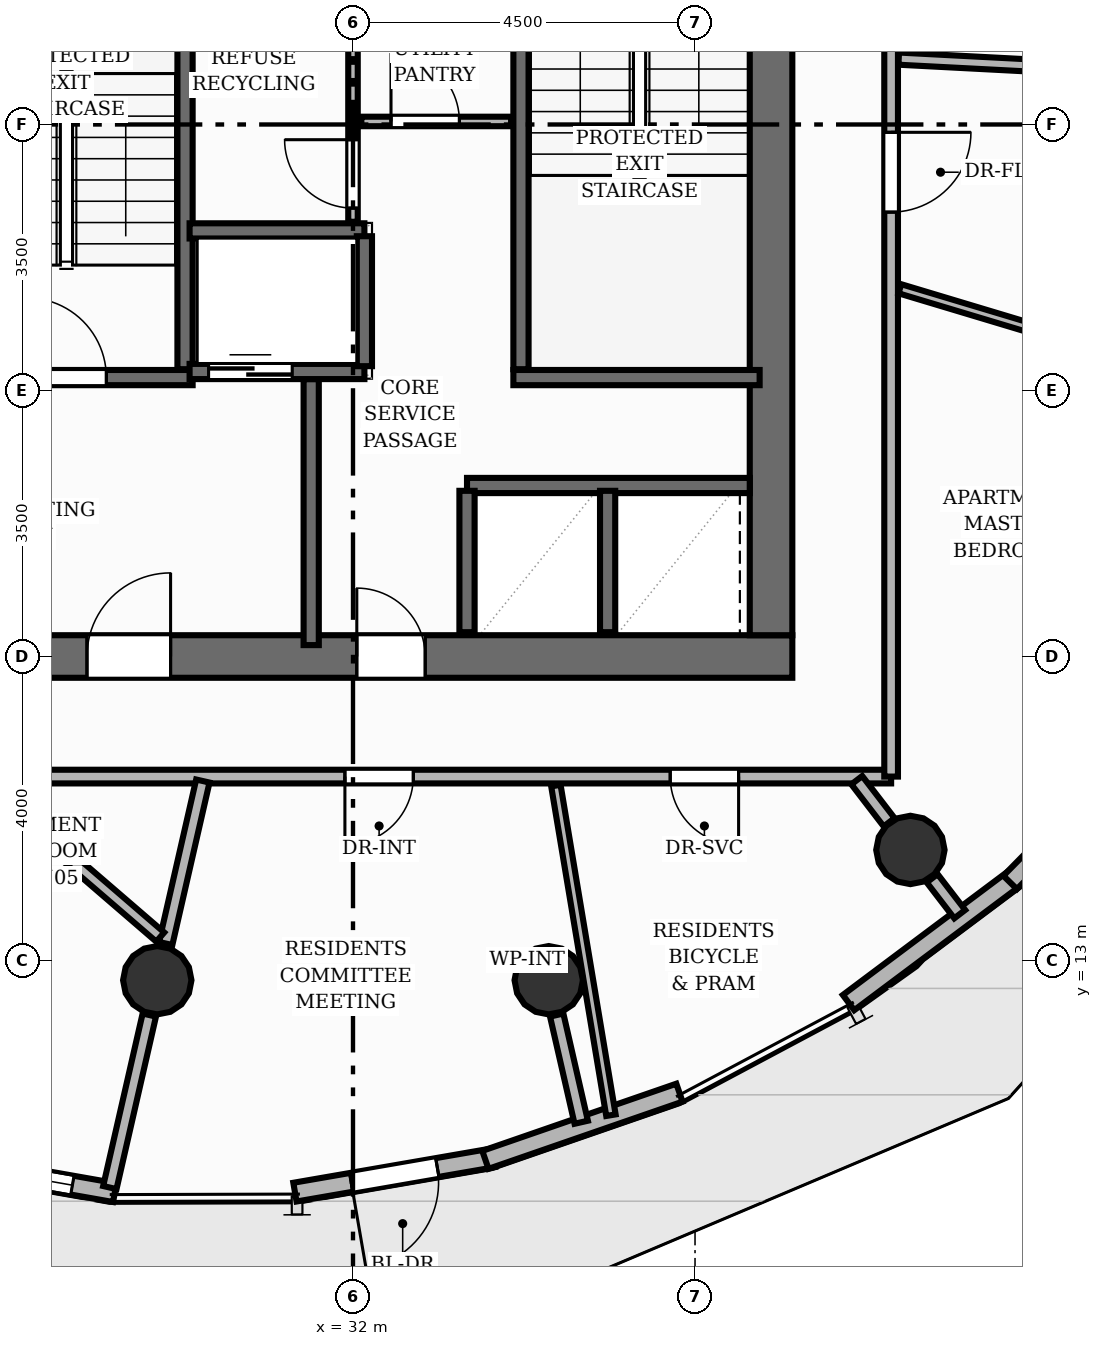
"""IFC4 building model, lengths in metres.
Left out: names, types, materials, properties, quantities, classifications, styles, units other than length and angle.
Written with IfcOpenShell. Run it as: python <this file> out.ifc"""

import sys

from ifc_helpers import new_model, si_unit, direction, frame, frame_2d, origin, origin_2d, place, context, subcontext, project, spatial, rectangle, circle, extrude, element, fill, save


model = new_model("IFC4")
c1 = context("Model", 3, precision=1e-05, world=origin(), true_north=direction((0.0, 1.0)))
c2 = subcontext(c1, "Body", "Model", "MODEL_VIEW")
j1 = project(units=[si_unit("LENGTHUNIT", "METRE"), si_unit("PLANEANGLEUNIT", "RADIAN")], contexts=[c1])
p1 = place(None, origin())
s1 = spatial("IfcSite", under=j1, at=p1, CompositionType="ELEMENT")
p2 = place(p1, origin())
s2 = spatial("IfcBuilding", under=s1, at=p2, CompositionType="ELEMENT")
p3 = place(p2, frame((0.0, 0.0, 172.64)))
s3 = spatial("IfcBuildingStorey", under=s2, at=p3, CompositionType="ELEMENT", Elevation=172.64)
p4 = place(p3, frame((26.22, 17.0, 0.0), z_axis=(0.0, 0.0, 1.0), x_axis=(1.0, 0.0, 0.0)))
e1 = element("IfcWall", 1, at=p4, inside=s3, PredefinedType="SHEAR", context=c2, shape_type="SweptSolid", body=[
    extrude(rectangle(XDim=11.56, YDim=0.56, at=frame_2d((5.78, 0.0))), origin(), (0.0, 0.0, 1.0), 3.2),
])
p5 = place(p4, frame((2.28, 0.0, 0.0)))
e2 = element("IfcOpeningElement", 2, at=p5, cuts=e1, PredefinedType="OPENING", context=c2, shape_type="SweptSolid", body=[
    extrude(rectangle(XDim=1.1, YDim=2.15, at=frame_2d((0.55, 1.075))), frame((0.0, 0.29, 0.0), z_axis=(0.0, -1.0, 0.0), x_axis=(1.0, 0.0, 0.0)), (0.0, 0.0, 1.0), 0.58),
])
p6 = place(p4, frame((5.83, 0.0, 0.0)))
e3 = element("IfcOpeningElement", 3, at=p6, cuts=e1, PredefinedType="OPENING", context=c2, shape_type="SweptSolid", body=[
    extrude(rectangle(XDim=0.9, YDim=2.1, at=frame_2d((0.45, 1.05))), frame((0.0, 0.29, 0.0), z_axis=(0.0, -1.0, 0.0), x_axis=(1.0, 0.0, 0.0)), (0.0, 0.0, 1.0), 0.58),
])
p7 = place(p3, frame((37.5, 17.28, 0.0), z_axis=(0.0, 0.0, 1.0), x_axis=(0.0, 1.0, 0.0)))
e4 = element("IfcWall", 4, at=p7, inside=s3, PredefinedType="SHEAR", context=c2, shape_type="SweptSolid", body=[
    extrude(rectangle(XDim=13.44, YDim=0.56, at=frame_2d((6.72, 0.0))), origin(), (0.0, 0.0, 1.0), 3.2),
])
for number, where, z_axis, x_axis in (
    (5, (29.425, 12.74, 0.0), (0.0, 0.0, 1.0), (1.0, 0.0, 0.0)),
    (6, (34.575, 12.74, 0.0), (0.0, 0.0, 1.0), (1.0, 0.0, 0.0)),
    (7, (39.333, 14.455, 0.0), (0.0, 0.0, 1.0), (1.0, 0.0, 0.0)),
):
    element("IfcColumn", number, at=place(p3, frame(where, z_axis=z_axis, x_axis=x_axis)), inside=s3, PredefinedType="COLUMN", context=c2, shape_type="SweptSolid", body=[
        extrude(circle(Radius=0.45, at=origin_2d()), origin(), (0.0, 0.0, 1.0), 3.2),
    ])
p8 = place(p3, frame((28.865, 9.945, 0.0), z_axis=(0.0, 0.0, 1.0), x_axis=(-0.984837873762, 0.173477267688, 0.0)))
e8 = element("IfcWall", 8, at=p8, inside=s3, PredefinedType="SOLIDWALL", context=c2, shape_type="SweptSolid", body=[
    extrude(rectangle(XDim=2.532, YDim=0.25, at=frame_2d((1.266, 0.0))), origin(), (0.0, 0.0, 1.0), 2.96),
])
p9 = place(p8, frame((0.566, 0.0, 0.85)))
e9 = element("IfcOpeningElement", 9, at=p9, cuts=e8, PredefinedType="OPENING", context=c2, shape_type="SweptSolid", body=[
    extrude(rectangle(XDim=1.4, YDim=1.55, at=frame_2d((0.7, 0.775))), frame((0.0, 0.135, 0.0), z_axis=(0.0, -1.0, 0.0), x_axis=(1.0, 0.0, 0.0)), (0.0, 0.0, 1.0), 0.27),
])
p10 = place(p3, frame((33.848, 10.405, 0.0), z_axis=(0.0, 0.0, 1.0), x_axis=(-0.985331154473, -0.170653203967, 0.0)))
e10 = element("IfcWall", 10, at=p10, inside=s3, PredefinedType="SOLIDWALL", context=c2, shape_type="SweptSolid", body=[
    extrude(rectangle(XDim=2.651, YDim=0.25, at=frame_2d((1.325, 0.0))), origin(), (0.0, 0.0, 1.0), 2.96),
])
p11 = place(p10, frame((0.75, 0.0, 0.0)))
e11 = element("IfcOpeningElement", 11, at=p11, cuts=e10, PredefinedType="OPENING", context=c2, shape_type="SweptSolid", body=[
    extrude(rectangle(XDim=1.15, YDim=2.2, at=frame_2d((0.575, 1.1))), frame((0.0, 0.135, 0.0), z_axis=(0.0, -1.0, 0.0), x_axis=(1.0, 0.0, 0.0)), (0.0, 0.0, 1.0), 0.27),
])
p12 = place(p3, frame((36.295, 11.261, 0.0), z_axis=(0.0, 0.0, 1.0), x_axis=(-0.945016150651, -0.327023661236, 0.0)))
e12 = element("IfcWall", 12, at=p12, inside=s3, PredefinedType="SOLIDWALL", context=c2, shape_type="SweptSolid", body=[
    extrude(rectangle(XDim=2.702, YDim=0.25, at=frame_2d((1.351, 0.0))), origin(), (0.0, 0.0, 1.0), 2.96),
])
p13 = place(p3, frame((40.728, 14.099, 0.0), z_axis=(0.0, 0.0, 1.0), x_axis=(-0.800636941996, -0.599149803564, 0.0)))
e13 = element("IfcWall", 13, at=p13, inside=s3, PredefinedType="SOLIDWALL", context=c2, shape_type="SweptSolid", body=[
    extrude(rectangle(XDim=2.758, YDim=0.25, at=frame_2d((1.379, 0.0))), origin(), (0.0, 0.0, 1.0), 2.96),
])
p14 = place(p3, frame((42.579, 15.995, 0.0), z_axis=(0.0, 0.0, 1.0), x_axis=(-0.700794099323, -0.713363603189, 0.0)))
e14 = element("IfcWall", 14, at=p14, inside=s3, PredefinedType="SOLIDWALL", context=c2, shape_type="SweptSolid", body=[
    extrude(rectangle(XDim=2.758, YDim=0.25, at=frame_2d((1.379, 0.0))), origin(), (0.0, 0.0, 1.0), 2.96),
])
p15 = place(p14, frame((0.554, 0.0, 0.85)))
e15 = element("IfcOpeningElement", 15, at=p15, cuts=e14, PredefinedType="OPENING", context=c2, shape_type="SweptSolid", body=[
    extrude(rectangle(XDim=1.65, YDim=1.55, at=frame_2d((0.825, 0.775))), frame((0.0, 0.135, 0.0), z_axis=(0.0, -1.0, 0.0), x_axis=(1.0, 0.0, 0.0)), (0.0, 0.0, 1.0), 0.27),
])
p16 = place(p3, frame((29.79, 20.78, 0.0), z_axis=(0.0, 0.0, 1.0), x_axis=(0.0, 1.0, 0.0)))
e16 = element("IfcWall", 16, at=p16, inside=s3, PredefinedType="SHEAR", context=c2, shape_type="SweptSolid", body=[
    extrude(rectangle(XDim=6.44, YDim=0.2, at=frame_2d((3.22, 0.0))), origin(), (0.0, 0.0, 1.0), 3.2),
])
p17 = place(p3, frame((26.65, 20.67, 0.0), z_axis=(0.0, 0.0, 1.0), x_axis=(1.0, 0.0, 0.0)))
e17 = element("IfcWall", 17, at=p17, inside=s3, PredefinedType="SHEAR", context=c2, shape_type="SweptSolid", body=[
    extrude(rectangle(XDim=3.24, YDim=0.2, at=frame_2d((1.62, 0.0))), origin(), (0.0, 0.0, 1.0), 3.2),
])
p18 = place(p17, frame((1.055, 0.0, 0.0)))
e18 = element("IfcOpeningElement", 18, at=p18, cuts=e17, PredefinedType="OPENING", context=c2, shape_type="SweptSolid", body=[
    extrude(rectangle(XDim=1.05, YDim=2.15, at=frame_2d((0.525, 1.075))), frame((0.0, 0.11, 0.0), z_axis=(0.0, -1.0, 0.0), x_axis=(1.0, 0.0, 0.0)), (0.0, 0.0, 1.0), 0.22),
])
p19 = place(p3, frame((34.21, 20.78, 0.0), z_axis=(0.0, 0.0, 1.0), x_axis=(0.0, 1.0, 0.0)))
e19 = element("IfcWall", 19, at=p19, inside=s3, PredefinedType="SHEAR", context=c2, shape_type="SweptSolid", body=[
    extrude(rectangle(XDim=6.44, YDim=0.2, at=frame_2d((3.22, 0.0))), origin(), (0.0, 0.0, 1.0), 3.2),
])
p20 = place(p3, frame((34.11, 20.67, 0.0), z_axis=(0.0, 0.0, 1.0), x_axis=(1.0, 0.0, 0.0)))
e20 = element("IfcWall", 20, at=p20, inside=s3, PredefinedType="SHEAR", context=c2, shape_type="SweptSolid", body=[
    extrude(rectangle(XDim=3.24, YDim=0.2, at=frame_2d((1.62, 0.0))), origin(), (0.0, 0.0, 1.0), 3.2),
])
p21 = place(p3, frame((31.45, 17.15, 0.0), z_axis=(0.0, 0.0, 1.0), x_axis=(0.0, 1.0, 0.0)))
e21 = element("IfcWall", 21, at=p21, inside=s3, PredefinedType="SHEAR", context=c2, shape_type="SweptSolid", body=[
    extrude(rectangle(XDim=3.5, YDim=0.2, at=frame_2d((1.75, 0.0))), origin(), (0.0, 0.0, 1.0), 3.2),
])
p22 = place(p3, frame((29.85, 20.75, 0.0), z_axis=(0.0, 0.0, 1.0), x_axis=(1.0, 0.0, 0.0)))
e22 = element("IfcWall", 22, at=p22, inside=s3, PredefinedType="SHEAR", context=c2, shape_type="SweptSolid", body=[
    extrude(rectangle(XDim=2.3, YDim=0.2, at=frame_2d((1.15, 0.0))), origin(), (0.0, 0.0, 1.0), 3.2),
])
p23 = place(p22, frame((0.25, 0.0, 0.0)))
e23 = element("IfcOpeningElement", 23, at=p23, cuts=e22, PredefinedType="OPENING", context=c2, shape_type="SweptSolid", body=[
    extrude(rectangle(XDim=1.1, YDim=2.15, at=frame_2d((0.55, 1.075))), frame((0.0, 0.11, 0.0), z_axis=(0.0, -1.0, 0.0), x_axis=(1.0, 0.0, 0.0)), (0.0, 0.0, 1.0), 0.22),
])
p24 = place(p3, frame((29.85, 22.6, 0.0), z_axis=(0.0, 0.0, 1.0), x_axis=(1.0, 0.0, 0.0)))
e24 = element("IfcWall", 24, at=p24, inside=s3, PredefinedType="SHEAR", context=c2, shape_type="SweptSolid", body=[
    extrude(rectangle(XDim=2.3, YDim=0.2, at=frame_2d((1.15, 0.0))), origin(), (0.0, 0.0, 1.0), 3.2),
])
p25 = place(p3, frame((32.15, 20.82, 0.0), z_axis=(0.0, 0.0, 1.0), x_axis=(0.0, 1.0, 0.0)))
e25 = element("IfcWall", 25, at=p25, inside=s3, PredefinedType="SHEAR", context=c2, shape_type="SweptSolid", body=[
    extrude(rectangle(XDim=1.71, YDim=0.2, at=frame_2d((0.855, 0.0))), origin(), (0.0, 0.0, 1.0), 3.2),
])
p26 = place(p3, frame((33.5, 19.25, 0.0), z_axis=(0.0, 0.0, 1.0), x_axis=(1.0, 0.0, 0.0)))
e26 = element("IfcWall", 26, at=p26, inside=s3, PredefinedType="SHEAR", context=c2, shape_type="SweptSolid", body=[
    extrude(rectangle(XDim=3.72, YDim=0.2, at=frame_2d((1.86, 0.0))), origin(), (0.0, 0.0, 1.0), 3.2),
])
for number, where, z_axis, x_axis in (
    (27, (33.5, 17.32, 0.0), (0.0, 0.0, 1.0), (0.0, 1.0, 0.0)),
    (28, (35.35, 17.32, 0.0), (0.0, 0.0, 1.0), (0.0, 1.0, 0.0)),
):
    element("IfcWall", number, at=place(p3, frame(where, z_axis=z_axis, x_axis=x_axis)), inside=s3, PredefinedType="SHEAR", context=c2, shape_type="SweptSolid", body=[
        extrude(rectangle(XDim=1.86, YDim=0.2, at=frame_2d((0.93, 0.0))), origin(), (0.0, 0.0, 1.0), 3.2),
    ])
p27 = place(p3, frame((32.0, 22.72, 0.0), z_axis=(0.0, 0.0, 1.0), x_axis=(0.0, 1.0, 0.0)))
e29 = element("IfcWall", 29, at=p27, inside=s3, PredefinedType="PARTITIONING", context=c2, shape_type="SweptSolid", body=[
    extrude(rectangle(XDim=2.52, YDim=0.125, at=frame_2d((1.26, 0.0))), origin(), (0.0, 0.0, 1.0), 2.955),
])
p28 = place(p27, frame((0.18, 0.0, 0.0)))
e30 = element("IfcOpeningElement", 30, at=p28, cuts=e29, PredefinedType="OPENING", context=c2, shape_type="SweptSolid", body=[
    extrude(rectangle(XDim=0.9, YDim=2.1, at=frame_2d((0.45, 1.05))), frame((0.0, 0.073, 0.0), z_axis=(0.0, -1.0, 0.0), x_axis=(1.0, 0.0, 0.0)), (0.0, 0.0, 1.0), 0.145),
])
p29 = place(p3, frame((32.11, 24.04, 0.0), z_axis=(0.0, 0.0, 1.0), x_axis=(1.0, 0.0, 0.0)))
e31 = element("IfcWall", 31, at=p29, inside=s3, PredefinedType="PARTITIONING", context=c2, shape_type="SweptSolid", body=[
    extrude(rectangle(XDim=1.97, YDim=0.125, at=frame_2d((0.985, 0.0))), origin(), (0.0, 0.0, 1.0), 2.955),
])
p30 = place(p29, frame((0.39, 0.0, 0.0)))
e32 = element("IfcOpeningElement", 32, at=p30, cuts=e31, PredefinedType="OPENING", context=c2, shape_type="SweptSolid", body=[
    extrude(rectangle(XDim=0.9, YDim=2.1, at=frame_2d((0.45, 1.05))), frame((0.0, 0.073, 0.0), z_axis=(0.0, -1.0, 0.0), x_axis=(1.0, 0.0, 0.0)), (0.0, 0.0, 1.0), 0.145),
])
p31 = place(p3, frame((29.32, 12.282, 0.0), z_axis=(0.0, 0.0, 1.0), x_axis=(-0.222998449778, -0.974818799263, 0.0)))
e33 = element("IfcWall", 33, at=p31, inside=s3, PredefinedType="PARTITIONING", context=c2, shape_type="SweptSolid", body=[
    extrude(rectangle(XDim=2.329, YDim=0.18, at=frame_2d((1.164, 0.0))), origin(), (0.0, 0.0, 1.0), 2.404),
])
p32 = place(p3, frame((34.68, 12.282, 0.0), z_axis=(0.0, 0.0, 1.0), x_axis=(0.22299884629, -0.974818708557, 0.0)))
e34 = element("IfcWall", 34, at=p32, inside=s3, PredefinedType="PARTITIONING", context=c2, shape_type="SweptSolid", body=[
    extrude(rectangle(XDim=1.447, YDim=0.18, at=frame_2d((0.724, 0.0))), origin(), (0.0, 0.0, 1.0), 2.404),
])
p33 = place(p3, frame((39.62, 14.082, 0.0), z_axis=(0.0, 0.0, 1.0), x_axis=(0.609274747308, -0.792959193334, 0.0)))
e35 = element("IfcWall", 35, at=p33, inside=s3, PredefinedType="PARTITIONING", context=c2, shape_type="SweptSolid", body=[
    extrude(rectangle(XDim=0.595, YDim=0.18, at=frame_2d((0.298, 0.0))), origin(), (0.0, 0.0, 1.0), 2.404),
])
p34 = place(p3, frame((39.08, 15.42, 0.0), z_axis=(0.0, 0.0, 1.0), x_axis=(-1.0, 0.0, 0.0)))
e36 = element("IfcWall", 36, at=p34, inside=s3, PredefinedType="PARTITIONING", context=c2, shape_type="SweptSolid", body=[
    extrude(rectangle(XDim=14.16, YDim=0.18, at=frame_2d((7.08, 0.0))), origin(), (0.0, 0.0, 1.0), 2.955),
])
p35 = place(p34, frame((2.007, 0.0, 0.0)))
e37 = element("IfcOpeningElement", 37, at=p35, cuts=e36, PredefinedType="OPENING", context=c2, shape_type="SweptSolid", body=[
    extrude(rectangle(XDim=0.9, YDim=2.1, at=frame_2d((0.45, 1.05))), frame((0.0, 0.1, 0.0), z_axis=(0.0, -1.0, 0.0), x_axis=(1.0, 0.0, 0.0)), (0.0, 0.0, 1.0), 0.2),
])
p36 = place(p34, frame((6.287, 0.0, 0.0)))
e38 = element("IfcOpeningElement", 38, at=p36, cuts=e36, PredefinedType="OPENING", context=c2, shape_type="SweptSolid", body=[
    extrude(rectangle(XDim=0.9, YDim=2.1, at=frame_2d((0.45, 1.05))), frame((0.0, 0.1, 0.0), z_axis=(0.0, -1.0, 0.0), x_axis=(1.0, 0.0, 0.0)), (0.0, 0.0, 1.0), 0.2),
])
p37 = place(p3, frame((39.08, 30.248, 0.0), z_axis=(0.0, 0.0, 1.0), x_axis=(0.0, -1.0, 0.0)))
e39 = element("IfcWall", 39, at=p37, inside=s3, PredefinedType="PARTITIONING", context=c2, shape_type="SweptSolid", body=[
    extrude(rectangle(XDim=14.828, YDim=0.18, at=frame_2d((7.414, 0.0))), origin(), (0.0, 0.0, 1.0), 2.955),
])
p38 = place(p37, frame((6.351, 0.0, 0.0)))
e40 = element("IfcOpeningElement", 40, at=p38, cuts=e39, PredefinedType="OPENING", context=c2, shape_type="SweptSolid", body=[
    extrude(rectangle(XDim=1.05, YDim=2.15, at=frame_2d((0.525, 1.075))), frame((0.0, 0.1, 0.0), z_axis=(0.0, -1.0, 0.0), x_axis=(1.0, 0.0, 0.0)), (0.0, 0.0, 1.0), 0.2),
])
p39 = place(p3, frame((35.394, 10.965, 0.0), z_axis=(0.0, 0.0, 1.0), x_axis=(-0.164741128257, 0.986336839351, 0.0)))
e41 = element("IfcWall", 41, at=p39, inside=s3, PredefinedType="PARTITIONING", context=c2, shape_type="SweptSolid", body=[
    extrude(rectangle(XDim=4.397, YDim=0.125, at=frame_2d((2.198, 0.0))), origin(), (0.0, 0.0, 1.0), 2.955),
])
p40 = place(p3, frame((38.628, 15.372, 0.0), z_axis=(0.0, 0.0, 1.0), x_axis=(0.609304996033, -0.792935950635, 0.0)))
e42 = element("IfcWall", 42, at=p40, inside=s3, PredefinedType="PARTITIONING", context=c2, shape_type="SweptSolid", body=[
    extrude(rectangle(XDim=0.698, YDim=0.18, at=frame_2d((0.349, 0.0))), origin(), (0.0, 0.0, 1.0), 2.404),
])
p41 = place(p3, frame((29.535, 13.224, 0.0), z_axis=(0.0, 0.0, 1.0), x_axis=(0.222891307908, 0.97484330272, 0.0)))
e43 = element("IfcWall", 43, at=p41, inside=s3, PredefinedType="PARTITIONING", context=c2, shape_type="SweptSolid", body=[
    extrude(rectangle(XDim=2.193, YDim=0.18, at=frame_2d((1.096, 0.0))), origin(), (0.0, 0.0, 1.0), 2.404),
])
p42 = place(p3, frame((39.18, 24.867, 0.0), z_axis=(0.0, 0.0, 1.0), x_axis=(0.998636225788, -0.052208127179, 0.0)))
e44 = element("IfcWall", 44, at=p42, inside=s3, PredefinedType="PLUMBINGWALL", context=c2, shape_type="SweptSolid", body=[
    extrude(rectangle(XDim=7.052, YDim=0.16, at=frame_2d((3.526, 0.0))), origin(), (0.0, 0.0, 1.0), 2.692),
])
p43 = place(p42, frame((3.076, 0.0, 0.0)))
e45 = element("IfcOpeningElement", 45, at=p43, cuts=e44, PredefinedType="OPENING", context=c2, shape_type="SweptSolid", body=[
    extrude(rectangle(XDim=0.9, YDim=2.1, at=frame_2d((0.45, 1.05))), frame((0.0, 0.09, 0.0), z_axis=(0.0, -1.0, 0.0), x_axis=(1.0, 0.0, 0.0)), (0.0, 0.0, 1.0), 0.18),
])
p44 = place(p3, frame((45.061, 20.077, 0.0), z_axis=(0.0, 0.0, 1.0), x_axis=(-0.957731888454, 0.287662353878, 0.0)))
e46 = element("IfcWall", 46, at=p44, inside=s3, PredefinedType="PARTITIONING", context=c2, shape_type="SweptSolid", body=[
    extrude(rectangle(XDim=6.125, YDim=0.125, at=frame_2d((3.062, 0.0))), origin(), (0.0, 0.0, 1.0), 2.692),
])
p45 = place(p44, frame((2.613, 0.0, 0.0)))
e47 = element("IfcOpeningElement", 47, at=p45, cuts=e46, PredefinedType="OPENING", context=c2, shape_type="SweptSolid", body=[
    extrude(rectangle(XDim=0.9, YDim=2.1, at=frame_2d((0.45, 1.05))), frame((0.0, 0.073, 0.0), z_axis=(0.0, -1.0, 0.0), x_axis=(1.0, 0.0, 0.0)), (0.0, 0.0, 1.0), 0.145),
])
p46 = place(p3, frame((29.464, 13.309, 0.0), z_axis=(0.0, 0.0, 1.0), x_axis=(-0.757457065386, 0.652884977693, 0.0)))
e48 = element("IfcWall", 48, at=p46, inside=s3, PredefinedType="PLUMBINGWALL", context=c2, shape_type="SweptSolid", body=[
    extrude(rectangle(XDim=2.475, YDim=0.16, at=frame_2d((1.237, 0.0))), origin(), (0.0, 0.0, 1.0), 2.955),
])
p47 = place(p11, origin())
e49 = element("IfcDoor", 49, at=p47, inside=s3, OperationType="SINGLE_SWING_RIGHT", PredefinedType="DOOR", context=c2, shape_type="SweptSolid", body=[
    extrude(rectangle(XDim=1.15, YDim=2.2, at=frame_2d((0.575, 1.1))), frame((0.0, 0.025, 0.0), z_axis=(0.0, -1.0, 0.0), x_axis=(1.0, 0.0, 0.0)), (0.0, 0.0, 1.0), 0.05),
])
fill(e11, e49)
p48 = place(p9, origin())
e50 = element("IfcWindow", 50, at=p48, inside=s3, PartitioningType="SINGLE_PANEL", PredefinedType="WINDOW", context=c2, shape_type="SweptSolid", body=[
    extrude(rectangle(XDim=1.4, YDim=1.55, at=frame_2d((0.7, 0.775))), frame((0.0, 0.03, 0.0), z_axis=(0.0, -1.0, 0.0), x_axis=(1.0, 0.0, 0.0)), (0.0, 0.0, 1.0), 0.06),
])
fill(e9, e50)
p49 = place(p18, origin())
e51 = element("IfcDoor", 51, at=p49, inside=s3, OperationType="SINGLE_SWING_LEFT", PredefinedType="DOOR", context=c2, shape_type="SweptSolid", body=[
    extrude(rectangle(XDim=1.05, YDim=2.15, at=frame_2d((0.525, 1.075))), frame((0.0, 0.025, 0.0), z_axis=(0.0, -1.0, 0.0), x_axis=(1.0, 0.0, 0.0)), (0.0, 0.0, 1.0), 0.05),
])
fill(e18, e51)
p50 = place(p5, origin())
e52 = element("IfcDoor", 52, at=p50, inside=s3, OperationType="SINGLE_SWING_RIGHT", PredefinedType="DOOR", context=c2, shape_type="SweptSolid", body=[
    extrude(rectangle(XDim=1.1, YDim=2.15, at=frame_2d((0.55, 1.075))), frame((0.0, 0.025, 0.0), z_axis=(0.0, -1.0, 0.0), x_axis=(1.0, 0.0, 0.0)), (0.0, 0.0, 1.0), 0.05),
])
fill(e2, e52)
p51 = place(p23, origin())
e53 = element("IfcDoor", 53, at=p51, inside=s3, OperationType="DOUBLE_DOOR_SLIDING", PredefinedType="DOOR", context=c2, shape_type="SweptSolid", body=[
    extrude(rectangle(XDim=1.1, YDim=2.15, at=frame_2d((0.55, 1.075))), frame((0.0, 0.025, 0.0), z_axis=(0.0, -1.0, 0.0), x_axis=(1.0, 0.0, 0.0)), (0.0, 0.0, 1.0), 0.05),
])
fill(e23, e53)
p52 = place(p6, origin())
e54 = element("IfcDoor", 54, at=p52, inside=s3, OperationType="SINGLE_SWING_LEFT", PredefinedType="DOOR", context=c2, shape_type="SweptSolid", body=[
    extrude(rectangle(XDim=0.9, YDim=2.1, at=frame_2d((0.45, 1.05))), frame((0.0, 0.025, 0.0), z_axis=(0.0, -1.0, 0.0), x_axis=(1.0, 0.0, 0.0)), (0.0, 0.0, 1.0), 0.05),
])
fill(e3, e54)
p53 = place(p30, origin())
e55 = element("IfcDoor", 55, at=p53, inside=s3, OperationType="SINGLE_SWING_LEFT", PredefinedType="DOOR", context=c2, shape_type="SweptSolid", body=[
    extrude(rectangle(XDim=0.9, YDim=2.1, at=frame_2d((0.45, 1.05))), frame((0.0, 0.025, 0.0), z_axis=(0.0, -1.0, 0.0), x_axis=(1.0, 0.0, 0.0)), (0.0, 0.0, 1.0), 0.05),
])
fill(e32, e55)
p54 = place(p28, origin())
e56 = element("IfcDoor", 56, at=p54, inside=s3, OperationType="SINGLE_SWING_RIGHT", PredefinedType="DOOR", context=c2, shape_type="SweptSolid", body=[
    extrude(rectangle(XDim=0.9, YDim=2.1, at=frame_2d((0.45, 1.05))), frame((0.0, 0.025, 0.0), z_axis=(0.0, -1.0, 0.0), x_axis=(1.0, 0.0, 0.0)), (0.0, 0.0, 1.0), 0.05),
])
fill(e30, e56)
p55 = place(p35, origin())
e57 = element("IfcDoor", 57, at=p55, inside=s3, OperationType="SINGLE_SWING_LEFT", PredefinedType="DOOR", context=c2, shape_type="SweptSolid", body=[
    extrude(rectangle(XDim=0.9, YDim=2.1, at=frame_2d((0.45, 1.05))), frame((0.0, 0.025, 0.0), z_axis=(0.0, -1.0, 0.0), x_axis=(1.0, 0.0, 0.0)), (0.0, 0.0, 1.0), 0.05),
])
fill(e37, e57)
p56 = place(p36, origin())
e58 = element("IfcDoor", 58, at=p56, inside=s3, OperationType="SINGLE_SWING_RIGHT", PredefinedType="DOOR", context=c2, shape_type="SweptSolid", body=[
    extrude(rectangle(XDim=0.9, YDim=2.1, at=frame_2d((0.45, 1.05))), frame((0.0, 0.025, 0.0), z_axis=(0.0, -1.0, 0.0), x_axis=(1.0, 0.0, 0.0)), (0.0, 0.0, 1.0), 0.05),
])
fill(e38, e58)
p57 = place(p38, origin())
e59 = element("IfcDoor", 59, at=p57, inside=s3, OperationType="SINGLE_SWING_LEFT", PredefinedType="DOOR", context=c2, shape_type="SweptSolid", body=[
    extrude(rectangle(XDim=1.05, YDim=2.15, at=frame_2d((0.525, 1.075))), frame((0.0, 0.025, 0.0), z_axis=(0.0, -1.0, 0.0), x_axis=(1.0, 0.0, 0.0)), (0.0, 0.0, 1.0), 0.05),
])
fill(e40, e59)
save(model, sys.argv[1])
